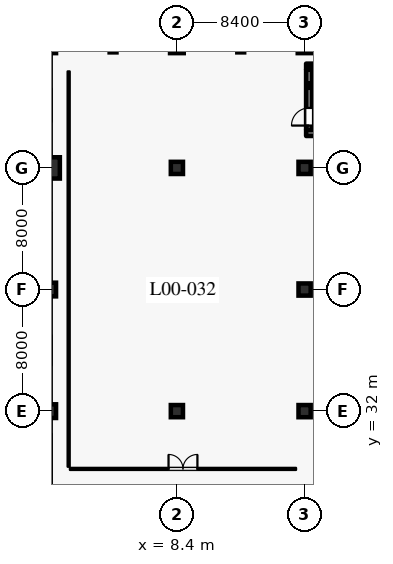
"""IFC4 building model, lengths in metres.
Left out: names, types, materials, properties, quantities, classifications, styles, units other than length and angle.
Written with IfcOpenShell. Run it as: python <this file> out.ifc"""

import sys

from ifc_helpers import new_model, si_unit, direction, frame, frame_2d, origin, origin_2d, place, context, subcontext, project, spatial, rectangle, hollow_rectangle, circle, extrude, element, fill, save


model = new_model("IFC4")
c1 = context("Model", 3, precision=1e-05, world=origin(), true_north=direction((0.0, 1.0)))
c2 = subcontext(c1, "Body", "Model", "MODEL_VIEW")
j1 = project(units=[si_unit("LENGTHUNIT", "METRE"), si_unit("PLANEANGLEUNIT", "RADIAN")], contexts=[c1])
p1 = place(None, origin())
s1 = spatial("IfcSite", under=j1, at=p1, CompositionType="ELEMENT")
p2 = place(p1, origin())
s2 = spatial("IfcBuilding", under=s1, at=p2, CompositionType="ELEMENT")
p3 = place(p2, origin())
s3 = spatial("IfcBuildingStorey", under=s2, at=p3, CompositionType="ELEMENT", Elevation=0.0)
for number, where, z_axis, x_axis in (
    (1, (0.0, 32.0, 0.0), (0.0, 0.0, 1.0), (1.0, 0.0, 0.0)),
    (2, (0.0, 40.0, 0.0), (0.0, 0.0, 1.0), (1.0, 0.0, 0.0)),
):
    element("IfcColumn", number, at=place(p3, frame(where, z_axis=z_axis, x_axis=x_axis)), inside=s3, PredefinedType="COLUMN", context=c2, shape_type="SweptSolid", body=[
        extrude(rectangle(XDim=0.9, YDim=0.9, at=origin_2d()), origin(), (0.0, 0.0, 1.0), 6.0),
    ])
p4 = place(p3, frame((0.0, 48.0, 0.0), z_axis=(0.0, 0.0, 1.0), x_axis=(1.0, 0.0, 0.0)))
e3 = element("IfcColumn", 3, at=p4, inside=s3, PredefinedType="COLUMN", context=c2, shape_type="SweptSolid", body=[
    extrude(circle(Radius=0.7, at=origin_2d()), origin(), (0.0, 0.0, 1.0), 6.0),
])
p5 = place(p3, frame((0.0, 56.0, 0.0), z_axis=(0.0, 0.0, 1.0), x_axis=(1.0, 0.0, 0.0)))
e4 = element("IfcColumn", 4, at=p5, inside=s3, PredefinedType="COLUMN", context=c2, shape_type="SweptSolid", body=[
    extrude(rectangle(XDim=0.9, YDim=0.9, at=origin_2d()), origin(), (0.0, 0.0, 1.0), 6.0),
])
for number, where, z_axis, x_axis in (
    (5, (8.4, 32.0, 0.0), (0.0, 0.0, 1.0), (1.0, 0.0, 0.0)),
    (6, (8.4, 40.0, 0.0), (0.0, 0.0, 1.0), (1.0, 0.0, 0.0)),
    (7, (8.4, 48.0, 0.0), (0.0, 0.0, 1.0), (1.0, 0.0, 0.0)),
):
    element("IfcColumn", number, at=place(p3, frame(where, z_axis=z_axis, x_axis=x_axis)), inside=s3, PredefinedType="COLUMN", context=c2, shape_type="SweptSolid", body=[
        extrude(rectangle(XDim=0.8, YDim=0.8, at=origin_2d()), origin(), (0.0, 0.0, 1.0), 6.0),
    ])
p6 = place(p3, frame((8.4, 56.0, 0.0), z_axis=(0.0, 0.0, 1.0), x_axis=(1.0, 0.0, 0.0)))
e8 = element("IfcColumn", 8, at=p6, inside=s3, PredefinedType="COLUMN", context=c2, shape_type="SweptSolid", body=[
    extrude(rectangle(XDim=0.9, YDim=0.9, at=origin_2d()), origin(), (0.0, 0.0, 1.0), 6.0),
])
for number, where, z_axis, x_axis in (
    (9, (16.8, 32.0, 0.0), (0.0, 0.0, 1.0), (1.0, 0.0, 0.0)),
    (10, (16.8, 40.0, 0.0), (0.0, 0.0, 1.0), (1.0, 0.0, 0.0)),
    (11, (16.8, 48.0, 0.0), (0.0, 0.0, 1.0), (1.0, 0.0, 0.0)),
):
    element("IfcColumn", number, at=place(p3, frame(where, z_axis=z_axis, x_axis=x_axis)), inside=s3, PredefinedType="COLUMN", context=c2, shape_type="SweptSolid", body=[
        extrude(rectangle(XDim=0.8, YDim=0.8, at=origin_2d()), origin(), (0.0, 0.0, 1.0), 6.0),
    ])
p7 = place(p3, frame((16.8, 56.0, 0.0), z_axis=(0.0, 0.0, 1.0), x_axis=(1.0, 0.0, 0.0)))
e12 = element("IfcColumn", 12, at=p7, inside=s3, PredefinedType="COLUMN", context=c2, shape_type="SweptSolid", body=[
    extrude(rectangle(XDim=0.9, YDim=0.9, at=origin_2d()), origin(), (0.0, 0.0, 1.0), 6.0),
])
for number, where, z_axis, x_axis in (
    (13, (16.9, 50.3, 0.0), (0.0, 0.0, 1.0), (1.0, 0.0, 0.0)),
    (14, (16.9, 54.66, 0.0), (0.0, 0.0, 1.0), (1.0, 0.0, 0.0)),
):
    element("IfcWall", number, at=place(p3, frame(where, z_axis=z_axis, x_axis=x_axis)), inside=s3, PredefinedType="SHEAR", context=c2, shape_type="SweptSolid", body=[
        extrude(rectangle(XDim=8.2, YDim=0.4, at=frame_2d((4.1, 0.0))), origin(), (0.0, 0.0, 1.0), 5.675),
    ])
p8 = place(p3, frame((17.1, 50.505, 0.0), z_axis=(0.0, 0.0, 1.0), x_axis=(0.0, 1.0, 0.0)))
e15 = element("IfcWall", 15, at=p8, inside=s3, PredefinedType="SHEAR", context=c2, shape_type="SweptSolid", body=[
    extrude(rectangle(XDim=3.95, YDim=0.4, at=frame_2d((1.975, 0.0))), origin(), (0.0, 0.0, 1.0), 5.675),
])
p9 = place(p8, frame((0.28, 0.0, 0.0)))
e16 = element("IfcOpeningElement", 16, at=p9, cuts=e15, PredefinedType="OPENING", context=c2, shape_type="SweptSolid", body=[
    extrude(rectangle(XDim=1.16, YDim=2.2, at=frame_2d((0.58, 1.1))), frame((0.0, 0.21, 0.0), z_axis=(0.0, -1.0, 0.0), x_axis=(1.0, 0.0, 0.0)), (0.0, 0.0, 1.0), 0.42),
])
for number, where, z_axis, x_axis in (
    (17, (17.28, 53.42, 0.0), (0.0, 0.0, 1.0), (1.0, 0.0, 0.0)),
    (18, (17.28, 54.66, 0.0), (0.0, 0.0, 1.0), (1.0, 0.0, 0.0)),
):
    element("IfcColumn", number, at=place(p3, frame(where, z_axis=z_axis, x_axis=x_axis)), inside=s3, PredefinedType="COLUMN", context=c2, shape_type="SweptSolid", body=[
        extrude(hollow_rectangle(XDim=0.3, YDim=0.3, WallThickness=0.012, at=origin_2d()), origin(), (0.0, 0.0, 1.0), 5.82),
    ])
p10 = place(p3, frame((1.36, 28.2, 0.0), z_axis=(0.0, 0.0, 1.0), x_axis=(1.0, 0.0, 0.0)))
e19 = element("IfcWall", 19, at=p10, inside=s3, PredefinedType="PARTITIONING", context=c2, shape_type="SweptSolid", body=[
    extrude(rectangle(XDim=14.88, YDim=0.14, at=frame_2d((7.44, 0.0))), origin(), (0.0, 0.0, 1.0), 5.675),
])
p11 = place(p10, frame((6.49, 0.0, 0.0)))
e20 = element("IfcOpeningElement", 20, at=p11, cuts=e19, PredefinedType="OPENING", context=c2, shape_type="SweptSolid", body=[
    extrude(rectangle(XDim=1.9, YDim=2.4, at=frame_2d((0.95, 1.2))), frame((0.0, 0.08, 0.0), z_axis=(0.0, -1.0, 0.0), x_axis=(1.0, 0.0, 0.0)), (0.0, 0.0, 1.0), 0.16),
])
p12 = place(p3, frame((1.28, 28.34, 0.0), z_axis=(0.0, 0.0, 1.0), x_axis=(0.0, 1.0, 0.0)))
e21 = element("IfcWall", 21, at=p12, inside=s3, PredefinedType="PARTITIONING", context=c2, shape_type="SweptSolid", body=[
    extrude(rectangle(XDim=26.01, YDim=0.14, at=frame_2d((13.005, 0.0))), origin(), (0.0, 0.0, 1.0), 5.675),
])
p13 = place(p9, origin())
e22 = element("IfcDoor", 22, at=p13, inside=s3, OperationType="SINGLE_SWING_LEFT", PredefinedType="DOOR", context=c2, shape_type="SweptSolid", body=[
    extrude(rectangle(XDim=1.16, YDim=2.2, at=frame_2d((0.58, 1.1))), frame((0.0, 0.025, 0.0), z_axis=(0.0, -1.0, 0.0), x_axis=(1.0, 0.0, 0.0)), (0.0, 0.0, 1.0), 0.05),
])
fill(e16, e22)
p14 = place(p11, origin())
e23 = element("IfcDoor", 23, at=p14, inside=s3, OperationType="DOUBLE_DOOR_SINGLE_SWING", PredefinedType="DOOR", context=c2, shape_type="SweptSolid", body=[
    extrude(rectangle(XDim=1.9, YDim=2.4, at=frame_2d((0.95, 1.2))), frame((0.0, 0.025, 0.0), z_axis=(0.0, -1.0, 0.0), x_axis=(1.0, 0.0, 0.0)), (0.0, 0.0, 1.0), 0.05),
])
fill(e20, e23)
save(model, sys.argv[1])
